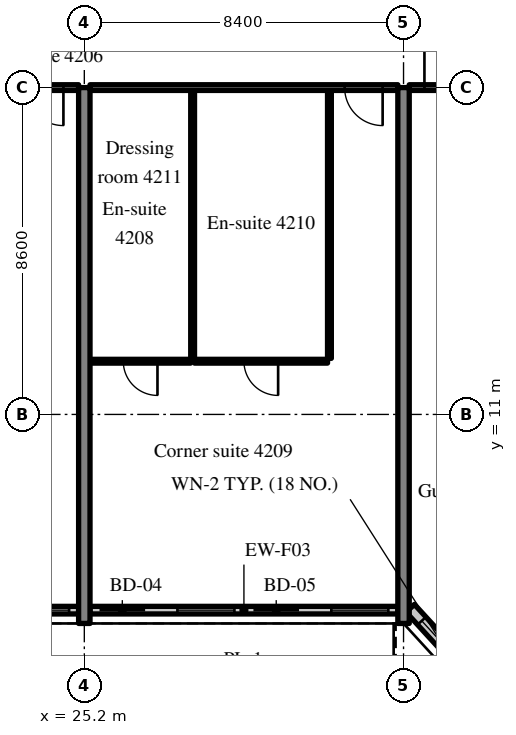
"""IFC4 building model, lengths in metres.
Left out: names, types, materials, properties, quantities, classifications, styles, units other than length and angle.
Written with IfcOpenShell. Run it as: python <this file> out.ifc"""

import sys

from ifc_helpers import new_model, si_unit, direction, frame, frame_2d, origin, place, context, subcontext, project, spatial, rectangle, extrude, source, transform, mapped, element, fill, save


model = new_model("IFC4")
c1 = context("Model", 3, precision=1e-05, world=origin(), true_north=direction((0.0, 1.0)))
c2 = subcontext(c1, "Body", "Model", "MODEL_VIEW")
j1 = project(units=[si_unit("LENGTHUNIT", "METRE"), si_unit("PLANEANGLEUNIT", "RADIAN")], contexts=[c1])
p1 = place(None, origin())
s1 = spatial("IfcSite", under=j1, at=p1, CompositionType="ELEMENT")
p2 = place(p1, origin())
s2 = spatial("IfcBuilding", under=s1, at=p2, CompositionType="ELEMENT")
p3 = place(p2, frame((0.0, 0.0, 174.4)))
s3 = spatial("IfcBuildingStorey", under=s2, at=p3, CompositionType="ELEMENT", Elevation=174.4)
m1 = source(origin(), c2, "Body", "SweptSolid", [
    extrude(rectangle(XDim=14.1, YDim=0.3, at=frame_2d((7.05, 0.0))), origin(), (0.0, 0.0, 1.0), 3.52),
])
for number, where, z_axis, x_axis in (
    (1, (25.2, 5.5, 0.0), (0.0, 0.0, 1.0), (0.0, 1.0, 0.0)),
    (2, (33.6, 5.5, 0.0), (0.0, 0.0, 1.0), (0.0, 1.0, 0.0)),
):
    element("IfcWall", number, at=place(p3, frame(where, z_axis=z_axis, x_axis=x_axis)), inside=s3, PredefinedType="SHEAR", context=c2, shape_type="MappedRepresentation", body=[
        mapped(m1, transform((0.0, 0.0, 0.0), scale=1.0)),
    ])
m2 = source(origin(), c2, "Body", "SweptSolid", [
    extrude(rectangle(XDim=8.1, YDim=0.2, at=frame_2d((4.05, 0.0))), origin(), (0.0, 0.0, 1.0), 2.87),
])
p4 = place(p3, frame((16.95, 5.85, 0.0), z_axis=(0.0, 0.0, 1.0), x_axis=(1.0, 0.0, 0.0)))
e3 = element("IfcWall", 3, at=p4, inside=s3, PredefinedType="SOLIDWALL", context=c2, shape_type="MappedRepresentation", body=[
    mapped(m2, transform((0.0, 0.0, 0.0), scale=1.0)),
])
m3 = source(origin(), c2, "Body", "SweptSolid", [
    extrude(rectangle(XDim=1.2, YDim=2.4, at=frame_2d((0.6, 1.2))), frame((0.0, 0.11, 0.0), z_axis=(0.0, -1.0, 0.0), x_axis=(1.0, 0.0, 0.0)), (0.0, 0.0, 1.0), 0.22),
])
p5 = place(p4, frame((0.25, 0.0, 0.0)))
e4 = element("IfcOpeningElement", 4, at=p5, cuts=e3, PredefinedType="OPENING", context=c2, shape_type="MappedRepresentation", body=[
    mapped(m3, transform((0.0, 0.0, 0.0), scale=1.0)),
])
m4 = source(origin(), c2, "Body", "SweptSolid", [
    extrude(rectangle(XDim=1.5, YDim=1.5, at=frame_2d((0.75, 0.75))), frame((0.0, 0.11, 0.0), z_axis=(0.0, -1.0, 0.0), x_axis=(1.0, 0.0, 0.0)), (0.0, 0.0, 1.0), 0.22),
])
p6 = place(p4, frame((2.3, 0.0, 0.9)))
e5 = element("IfcOpeningElement", 5, at=p6, cuts=e3, PredefinedType="OPENING", context=c2, shape_type="MappedRepresentation", body=[
    mapped(m4, transform((0.0, 0.0, 0.0), scale=1.0)),
])
p7 = place(p4, frame((4.3, 0.0, 0.0)))
e6 = element("IfcOpeningElement", 6, at=p7, cuts=e3, PredefinedType="OPENING", context=c2, shape_type="MappedRepresentation", body=[
    mapped(m3, transform((0.0, 0.0, 0.0), scale=1.0)),
])
p8 = place(p4, frame((6.35, 0.0, 0.9)))
e7 = element("IfcOpeningElement", 7, at=p8, cuts=e3, PredefinedType="OPENING", context=c2, shape_type="MappedRepresentation", body=[
    mapped(m4, transform((0.0, 0.0, 0.0), scale=1.0)),
])
m5 = source(origin(), c2, "Body", "SweptSolid", [
    extrude(rectangle(XDim=8.1, YDim=0.2, at=frame_2d((4.05, 0.0))), origin(), (0.0, 0.0, 1.0), 2.87),
])
p9 = place(p3, frame((25.35, 5.85, 0.0), z_axis=(0.0, 0.0, 1.0), x_axis=(1.0, 0.0, 0.0)))
e8 = element("IfcWall", 8, at=p9, inside=s3, PredefinedType="SOLIDWALL", context=c2, shape_type="MappedRepresentation", body=[
    mapped(m5, transform((0.0, 0.0, 0.0), scale=1.0)),
])
p10 = place(p9, frame((0.25, 0.0, 0.0)))
e9 = element("IfcOpeningElement", 9, at=p10, cuts=e8, PredefinedType="OPENING", context=c2, shape_type="MappedRepresentation", body=[
    mapped(m3, transform((0.0, 0.0, 0.0), scale=1.0)),
])
p11 = place(p9, frame((2.3, 0.0, 0.9)))
e10 = element("IfcOpeningElement", 10, at=p11, cuts=e8, PredefinedType="OPENING", context=c2, shape_type="MappedRepresentation", body=[
    mapped(m4, transform((0.0, 0.0, 0.0), scale=1.0)),
])
p12 = place(p9, frame((4.3, 0.0, 0.0)))
e11 = element("IfcOpeningElement", 11, at=p12, cuts=e8, PredefinedType="OPENING", context=c2, shape_type="MappedRepresentation", body=[
    mapped(m3, transform((0.0, 0.0, 0.0), scale=1.0)),
])
p13 = place(p9, frame((6.35, 0.0, 0.9)))
e12 = element("IfcOpeningElement", 12, at=p13, cuts=e8, PredefinedType="OPENING", context=c2, shape_type="MappedRepresentation", body=[
    mapped(m4, transform((0.0, 0.0, 0.0), scale=1.0)),
])
m6 = source(origin(), c2, "Body", "SweptSolid", [
    extrude(rectangle(XDim=2.398, YDim=0.3, at=frame_2d((1.199, 0.0))), origin(), (0.0, 0.0, 1.0), 3.52),
])
p14 = place(p3, frame((33.776, 5.9, 0.0), z_axis=(0.0, 0.0, 1.0), x_axis=(0.675374189419, -0.737475222815, 0.0)))
e13 = element("IfcWall", 13, at=p14, inside=s3, PredefinedType="SOLIDWALL", context=c2, shape_type="MappedRepresentation", body=[
    mapped(m6, transform((0.0, 0.0, 0.0), scale=1.0)),
])
m7 = source(origin(), c2, "Body", "SweptSolid", [
    extrude(rectangle(XDim=1.5, YDim=2.0, at=frame_2d((0.75, 1.0))), frame((0.0, 0.16, 0.0), z_axis=(0.0, -1.0, 0.0), x_axis=(1.0, 0.0, 0.0)), (0.0, 0.0, 1.0), 0.32),
])
p15 = place(p14, frame((0.449, 0.0, 0.9)))
e14 = element("IfcOpeningElement", 14, at=p15, cuts=e13, PredefinedType="OPENING", context=c2, shape_type="MappedRepresentation", body=[
    mapped(m7, transform((0.0, 0.0, 0.0), scale=1.0)),
])
m8 = source(origin(), c2, "Body", "SweptSolid", [
    extrude(rectangle(XDim=3.975, YDim=0.15, at=frame_2d((1.988, 0.0))), origin(), (0.0, 0.0, 1.0), 2.82),
])
p16 = place(p3, frame((21.075, 19.6, 0.0), z_axis=(0.0, 0.0, 1.0), x_axis=(1.0, 0.0, 0.0)))
e15 = element("IfcWall", 15, at=p16, inside=s3, PredefinedType="PARTITIONING", context=c2, shape_type="MappedRepresentation", body=[
    mapped(m8, transform((0.0, 0.0, 0.0), scale=1.0)),
])
m9 = source(origin(), c2, "Body", "SweptSolid", [
    extrude(rectangle(XDim=1.0, YDim=2.1, at=frame_2d((0.5, 1.05))), frame((0.0, 0.085, 0.0), z_axis=(0.0, -1.0, 0.0), x_axis=(1.0, 0.0, 0.0)), (0.0, 0.0, 1.0), 0.17),
])
p17 = place(p16, frame((2.575, 0.0, 0.0)))
e16 = element("IfcOpeningElement", 16, at=p17, cuts=e15, PredefinedType="OPENING", context=c2, shape_type="MappedRepresentation", body=[
    mapped(m9, transform((0.0, 0.0, 0.0), scale=1.0)),
])
m10 = source(origin(), c2, "Body", "SweptSolid", [
    extrude(rectangle(XDim=7.05, YDim=0.1, at=frame_2d((3.525, 0.0))), origin(), (0.0, 0.0, 1.0), 3.52),
])
for number, where, z_axis, x_axis in (
    (17, (31.65, 12.475, 0.0), (0.0, 0.0, 1.0), (0.0, 1.0, 0.0)),
    (18, (28.05, 12.475, 0.0), (0.0, 0.0, 1.0), (0.0, 1.0, 0.0)),
):
    element("IfcWall", number, at=place(p3, frame(where, z_axis=z_axis, x_axis=x_axis)), inside=s3, PredefinedType="PARTITIONING", context=c2, shape_type="MappedRepresentation", body=[
        mapped(m10, transform((0.0, 0.0, 0.0), scale=1.0)),
    ])
m11 = source(origin(), c2, "Body", "SweptSolid", [
    extrude(rectangle(XDim=3.5, YDim=0.1, at=frame_2d((1.75, 0.0))), origin(), (0.0, 0.0, 1.0), 3.52),
])
p18 = place(p3, frame((28.1, 12.4, 0.0), z_axis=(0.0, 0.0, 1.0), x_axis=(1.0, 0.0, 0.0)))
e19 = element("IfcWall", 19, at=p18, inside=s3, PredefinedType="PARTITIONING", context=c2, shape_type="MappedRepresentation", body=[
    mapped(m11, transform((0.0, 0.0, 0.0), scale=1.0)),
])
m12 = source(origin(), c2, "Body", "SweptSolid", [
    extrude(rectangle(XDim=0.9, YDim=2.1, at=frame_2d((0.45, 1.05))), frame((0.0, 0.06, 0.0), z_axis=(0.0, -1.0, 0.0), x_axis=(1.0, 0.0, 0.0)), (0.0, 0.0, 1.0), 0.12),
])
p19 = place(p18, frame((1.3, 0.0, 0.0)))
e20 = element("IfcOpeningElement", 20, at=p19, cuts=e19, PredefinedType="OPENING", context=c2, shape_type="MappedRepresentation", body=[
    mapped(m12, transform((0.0, 0.0, 0.0), scale=1.0)),
])
m13 = source(origin(), c2, "Body", "SweptSolid", [
    extrude(rectangle(XDim=2.65, YDim=0.1, at=frame_2d((1.325, 0.0))), origin(), (0.0, 0.0, 1.0), 3.52),
])
p20 = place(p3, frame((25.35, 12.4, 0.0), z_axis=(0.0, 0.0, 1.0), x_axis=(1.0, 0.0, 0.0)))
e21 = element("IfcWall", 21, at=p20, inside=s3, PredefinedType="PARTITIONING", context=c2, shape_type="MappedRepresentation", body=[
    mapped(m13, transform((0.0, 0.0, 0.0), scale=1.0)),
])
p21 = place(p20, frame((0.875, 0.0, 0.0)))
e22 = element("IfcOpeningElement", 22, at=p21, cuts=e21, PredefinedType="OPENING", context=c2, shape_type="MappedRepresentation", body=[
    mapped(m12, transform((0.0, 0.0, 0.0), scale=1.0)),
])
m14 = source(origin(), c2, "Body", "SweptSolid", [
    extrude(rectangle(XDim=8.1, YDim=0.15, at=frame_2d((4.05, 0.0))), origin(), (0.0, 0.0, 1.0), 2.82),
])
p22 = place(p3, frame((25.35, 19.6, 0.0), z_axis=(0.0, 0.0, 1.0), x_axis=(1.0, 0.0, 0.0)))
e23 = element("IfcWall", 23, at=p22, inside=s3, PredefinedType="PARTITIONING", context=c2, shape_type="MappedRepresentation", body=[
    mapped(m14, transform((0.0, 0.0, 0.0), scale=1.0)),
])
p23 = place(p22, frame((6.7, 0.0, 0.0)))
e24 = element("IfcOpeningElement", 24, at=p23, cuts=e23, PredefinedType="OPENING", context=c2, shape_type="MappedRepresentation", body=[
    mapped(m9, transform((0.0, 0.0, 0.0), scale=1.0)),
])
p24 = place(p3, frame((33.75, 19.6, 0.0), z_axis=(0.0, 0.0, 1.0), x_axis=(1.0, 0.0, 0.0)))
e25 = element("IfcWall", 25, at=p24, inside=s3, PredefinedType="PARTITIONING", context=c2, shape_type="MappedRepresentation", body=[
    mapped(m8, transform((0.0, 0.0, 0.0), scale=1.0)),
])
p25 = place(p24, frame((0.4, 0.0, 0.0)))
e26 = element("IfcOpeningElement", 26, at=p25, cuts=e25, PredefinedType="OPENING", context=c2, shape_type="MappedRepresentation", body=[
    mapped(m9, transform((0.0, 0.0, 0.0), scale=1.0)),
])
m15 = source(origin(), c2, "Body", "SweptSolid", [
    extrude(rectangle(XDim=1.5, YDim=1.5, at=frame_2d((0.75, 0.75))), frame((0.0, 0.03, 0.0), z_axis=(0.0, -1.0, 0.0), x_axis=(1.0, 0.0, 0.0)), (0.0, 0.0, 1.0), 0.06),
])
p26 = place(p8, origin())
e27 = element("IfcWindow", 27, at=p26, inside=s3, PartitioningType="SINGLE_PANEL", PredefinedType="WINDOW", context=c2, shape_type="MappedRepresentation", body=[
    mapped(m15, transform((0.0, 0.0, 0.0), scale=1.0)),
])
fill(e7, e27)
m16 = source(origin(), c2, "Body", "SweptSolid", [
    extrude(rectangle(XDim=1.2, YDim=2.4, at=frame_2d((0.6, 1.2))), frame((0.0, 0.025, 0.0), z_axis=(0.0, -1.0, 0.0), x_axis=(1.0, 0.0, 0.0)), (0.0, 0.0, 1.0), 0.05),
])
p27 = place(p10, origin())
e28 = element("IfcDoor", 28, at=p27, inside=s3, OperationType="SLIDING_TO_RIGHT", PredefinedType="DOOR", context=c2, shape_type="MappedRepresentation", body=[
    mapped(m16, transform((0.0, 0.0, 0.0), scale=1.0)),
])
fill(e9, e28)
p28 = place(p11, origin())
e29 = element("IfcWindow", 29, at=p28, inside=s3, PartitioningType="SINGLE_PANEL", PredefinedType="WINDOW", context=c2, shape_type="MappedRepresentation", body=[
    mapped(m15, transform((0.0, 0.0, 0.0), scale=1.0)),
])
fill(e10, e29)
p29 = place(p12, origin())
e30 = element("IfcDoor", 30, at=p29, inside=s3, OperationType="SLIDING_TO_LEFT", PredefinedType="DOOR", context=c2, shape_type="MappedRepresentation", body=[
    mapped(m16, transform((0.0, 0.0, 0.0), scale=1.0)),
])
fill(e11, e30)
p30 = place(p13, origin())
e31 = element("IfcWindow", 31, at=p30, inside=s3, PartitioningType="SINGLE_PANEL", PredefinedType="WINDOW", context=c2, shape_type="MappedRepresentation", body=[
    mapped(m15, transform((0.0, 0.0, 0.0), scale=1.0)),
])
fill(e12, e31)
m17 = source(origin(), c2, "Body", "SweptSolid", [
    extrude(rectangle(XDim=1.5, YDim=2.0, at=frame_2d((0.75, 1.0))), frame((0.0, 0.03, 0.0), z_axis=(0.0, -1.0, 0.0), x_axis=(1.0, 0.0, 0.0)), (0.0, 0.0, 1.0), 0.06),
])
p31 = place(p15, origin())
e32 = element("IfcWindow", 32, at=p31, inside=s3, PartitioningType="SINGLE_PANEL", PredefinedType="WINDOW", context=c2, shape_type="MappedRepresentation", body=[
    mapped(m17, transform((0.0, 0.0, 0.0), scale=1.0)),
])
fill(e14, e32)
m18 = source(origin(), c2, "Body", "SweptSolid", [
    extrude(rectangle(XDim=1.0, YDim=2.1, at=frame_2d((0.5, 1.05))), frame((0.0, 0.025, 0.0), z_axis=(0.0, -1.0, 0.0), x_axis=(1.0, 0.0, 0.0)), (0.0, 0.0, 1.0), 0.05),
])
p32 = place(p17, origin())
e33 = element("IfcDoor", 33, at=p32, inside=s3, OperationType="SINGLE_SWING_RIGHT", PredefinedType="DOOR", context=c2, shape_type="MappedRepresentation", body=[
    mapped(m18, transform((0.0, 0.0, 0.0), scale=1.0)),
])
fill(e16, e33)
m19 = source(origin(), c2, "Body", "SweptSolid", [
    extrude(rectangle(XDim=0.9, YDim=2.1, at=frame_2d((0.45, 1.05))), frame((0.0, 0.025, 0.0), z_axis=(0.0, -1.0, 0.0), x_axis=(1.0, 0.0, 0.0)), (0.0, 0.0, 1.0), 0.05),
])
p33 = place(p19, origin())
e34 = element("IfcDoor", 34, at=p33, inside=s3, OperationType="SINGLE_SWING_RIGHT", PredefinedType="DOOR", context=c2, shape_type="MappedRepresentation", body=[
    mapped(m19, transform((0.0, 0.0, 0.0), scale=1.0)),
])
fill(e20, e34)
p34 = place(p21, origin())
e35 = element("IfcDoor", 35, at=p34, inside=s3, OperationType="SINGLE_SWING_RIGHT", PredefinedType="DOOR", context=c2, shape_type="MappedRepresentation", body=[
    mapped(m19, transform((0.0, 0.0, 0.0), scale=1.0)),
])
fill(e22, e35)
p35 = place(p23, origin())
e36 = element("IfcDoor", 36, at=p35, inside=s3, OperationType="SINGLE_SWING_RIGHT", PredefinedType="DOOR", context=c2, shape_type="MappedRepresentation", body=[
    mapped(m18, transform((0.0, 0.0, 0.0), scale=1.0)),
])
fill(e24, e36)
p36 = place(p25, origin())
e37 = element("IfcDoor", 37, at=p36, inside=s3, OperationType="SINGLE_SWING_LEFT", PredefinedType="DOOR", context=c2, shape_type="MappedRepresentation", body=[
    mapped(m18, transform((0.0, 0.0, 0.0), scale=1.0)),
])
fill(e26, e37)
save(model, sys.argv[1])
